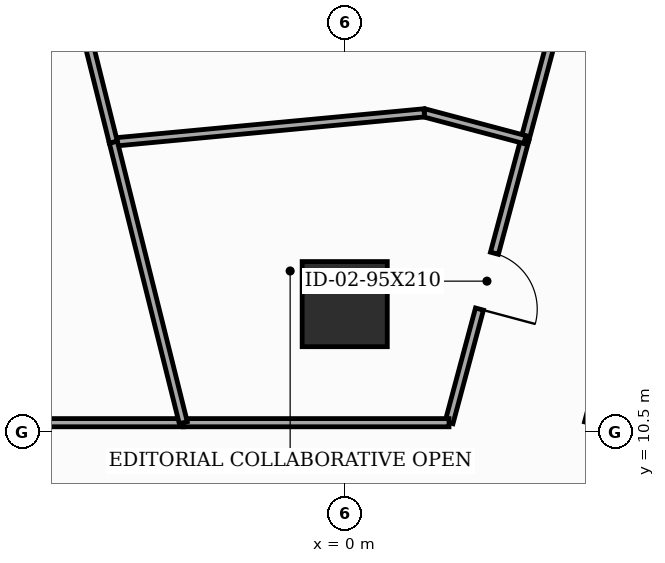
"""IFC4 building model, lengths in metres.
Left out: names, types, materials, properties, quantities, classifications, styles, units other than length and angle.
Written with IfcOpenShell. Run it as: python <this file> out.ifc"""

import sys

from ifc_helpers import new_model, si_unit, direction, frame, frame_2d, origin, origin_2d, place, context, subcontext, project, spatial, rectangle, extrude, element, fill, save


model = new_model("IFC4")
c1 = context("Model", 3, precision=1e-05, world=origin(), true_north=direction((0.0, 1.0)))
c2 = subcontext(c1, "Body", "Model", "MODEL_VIEW")
j1 = project(units=[si_unit("LENGTHUNIT", "METRE"), si_unit("PLANEANGLEUNIT", "RADIAN")], contexts=[c1])
p1 = place(None, origin())
s1 = spatial("IfcSite", under=j1, at=p1, CompositionType="ELEMENT")
p2 = place(p1, origin())
s2 = spatial("IfcBuilding", under=s1, at=p2, CompositionType="ELEMENT")
p3 = place(p2, frame((0.0, 0.0, 70.4)))
s3 = spatial("IfcBuildingStorey", under=s2, at=p3, CompositionType="ELEMENT", Elevation=70.4)
p4 = place(p3, frame((0.0, 12.6, 0.0), z_axis=(0.0, 0.0, 1.0), x_axis=(1.0, 0.0, 0.0)))
e1 = element("IfcColumn", 1, at=p4, inside=s3, PredefinedType="COLUMN", context=c2, shape_type="SweptSolid", body=[
    extrude(rectangle(XDim=1.4, YDim=1.4, at=origin_2d()), origin(), (0.0, 0.0, 1.0), 3.7),
])
p5 = place(p3, frame((2.963, 15.306, 0.0), z_axis=(0.0, 0.0, 1.0), x_axis=(-0.25886350996, -0.965913910869, 0.0)))
e2 = element("IfcWall", 2, at=p5, inside=s3, PredefinedType="PARTITIONING", context=c2, shape_type="SweptSolid", body=[
    extrude(rectangle(XDim=4.82, YDim=0.135, at=frame_2d((2.41, 0.0))), origin(), (0.0, 0.0, 1.0), 2.785),
])
p6 = place(p5, frame((1.935, 0.0, 0.0)))
e3 = element("IfcOpeningElement", 3, at=p6, cuts=e2, PredefinedType="OPENING", context=c2, shape_type="SweptSolid", body=[
    extrude(rectangle(XDim=0.95, YDim=2.1, at=frame_2d((0.475, 1.05))), frame((0.0, 0.077, 0.0), z_axis=(0.0, -1.0, 0.0), x_axis=(1.0, 0.0, 0.0)), (0.0, 0.0, 1.0), 0.155),
])
p7 = place(p3, frame((1.715, 10.65, 0.0), z_axis=(0.0, 0.0, 1.0), x_axis=(-1.0, 0.0, 0.0)))
e4 = element("IfcWall", 4, at=p7, inside=s3, PredefinedType="PARTITIONING", context=c2, shape_type="SweptSolid", body=[
    extrude(rectangle(XDim=4.37, YDim=0.135, at=frame_2d((2.185, 0.0))), origin(), (0.0, 0.0, 1.0), 2.785),
])
p8 = place(p3, frame((4.269, 20.183, 0.0), z_axis=(0.0, 0.0, 1.0), x_axis=(-0.258691774004, -0.965959919491, 0.0)))
e5 = element("IfcWall", 5, at=p8, inside=s3, PredefinedType="PARTITIONING", context=c2, shape_type="SweptSolid", body=[
    extrude(rectangle(XDim=5.049, YDim=0.135, at=frame_2d((2.524, 0.0))), origin(), (0.0, 0.0, 1.0), 3.085),
])
p9 = place(p8, frame((2.049, 0.0, 0.0)))
e6 = element("IfcOpeningElement", 6, at=p9, cuts=e5, PredefinedType="OPENING", context=c2, shape_type="SweptSolid", body=[
    extrude(rectangle(XDim=0.95, YDim=2.1, at=frame_2d((0.475, 1.05))), frame((0.0, 0.077, 0.0), z_axis=(0.0, -1.0, 0.0), x_axis=(1.0, 0.0, 0.0)), (0.0, 0.0, 1.0), 0.155),
])
p10 = place(p3, frame((3.992, 10.65, 0.0), z_axis=(0.0, 0.0, 1.0), x_axis=(0.258975157658, 0.965883982534, 0.0)))
e7 = element("IfcWall", 7, at=p10, inside=s3, PredefinedType="MOVABLE", context=c2, shape_type="SweptSolid", body=[
    extrude(rectangle(XDim=4.237, YDim=0.1, at=frame_2d((2.118, 0.0))), origin(), (0.0, 0.0, 1.0), 2.785),
])
p11 = place(p3, frame((-2.655, 10.65, 0.0), z_axis=(0.0, 0.0, 1.0), x_axis=(-1.0, 0.0, 0.0)))
e8 = element("IfcWall", 8, at=p11, inside=s3, PredefinedType="PARTITIONING", context=c2, shape_type="SweptSolid", body=[
    extrude(rectangle(XDim=7.495, YDim=0.135, at=frame_2d((3.748, 0.0))), origin(), (0.0, 0.0, 1.0), 2.785),
])
p12 = place(p3, frame((2.963, 15.306, 0.0), z_axis=(0.0, 0.0, 1.0), x_axis=(-0.966393308076, 0.257068034001, 0.0)))
e9 = element("IfcWall", 9, at=p12, inside=s3, PredefinedType="PARTITIONING", context=c2, shape_type="SweptSolid", body=[
    extrude(rectangle(XDim=1.712, YDim=0.135, at=frame_2d((0.856, 0.0))), origin(), (0.0, 0.0, 1.0), 2.785),
])
p13 = place(p3, frame((1.308, 15.746, 0.0), z_axis=(0.0, 0.0, 1.0), x_axis=(-0.995602282193, -0.09368081817, 0.0)))
e10 = element("IfcWall", 10, at=p13, inside=s3, PredefinedType="PARTITIONING", context=c2, shape_type="SweptSolid", body=[
    extrude(rectangle(XDim=5.137, YDim=0.135, at=frame_2d((2.568, 0.0))), origin(), (0.0, 0.0, 1.0), 2.785),
])
p14 = place(p3, frame((-3.806, 15.265, 0.0), z_axis=(0.0, 0.0, 1.0), x_axis=(0.241967938053, -0.970284245443, 0.0)))
e11 = element("IfcWall", 11, at=p14, inside=s3, PredefinedType="PARTITIONING", context=c2, shape_type="SweptSolid", body=[
    extrude(rectangle(XDim=4.756, YDim=0.135, at=frame_2d((2.378, 0.0))), origin(), (0.0, 0.0, 1.0), 2.785),
])
p15 = place(p3, frame((-7.718, 30.954, 0.0), z_axis=(0.0, 0.0, 1.0), x_axis=(0.241928072824, -0.9702941861, 0.0)))
e12 = element("IfcWall", 12, at=p15, inside=s3, PredefinedType="PARTITIONING", context=c2, shape_type="SweptSolid", body=[
    extrude(rectangle(XDim=16.169, YDim=0.135, at=frame_2d((8.085, 0.0))), origin(), (0.0, 0.0, 1.0), 2.935),
])
p16 = place(p6, origin())
e13 = element("IfcDoor", 13, at=p16, inside=s3, OperationType="SINGLE_SWING_RIGHT", PredefinedType="DOOR", context=c2, shape_type="SweptSolid", body=[
    extrude(rectangle(XDim=0.95, YDim=2.1, at=frame_2d((0.475, 1.05))), frame((0.0, 0.025, 0.0), z_axis=(0.0, -1.0, 0.0), x_axis=(1.0, 0.0, 0.0)), (0.0, 0.0, 1.0), 0.05),
])
fill(e3, e13)
save(model, sys.argv[1])
